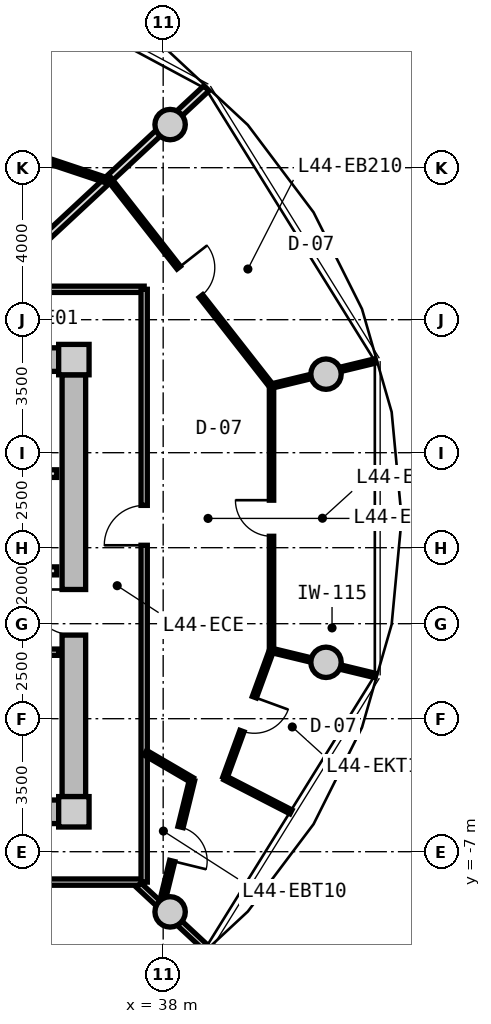
"""IFC4 building model, lengths in metres.
Left out: names, types, materials, properties, quantities, classifications, styles, units other than length and angle.
Written with IfcOpenShell. Run it as: python <this file> out.ifc"""

import sys

from ifc_helpers import new_model, si_unit, direction, frame, frame_2d, origin, origin_2d, place, context, subcontext, project, spatial, rectangle, circle, extrude, source, transform, mapped, element, fill, save


model = new_model("IFC4")
c1 = context("Model", 3, precision=1e-05, world=origin(), true_north=direction((0.0, 1.0)))
c2 = subcontext(c1, "Body", "Model", "MODEL_VIEW")
j1 = project(units=[si_unit("LENGTHUNIT", "METRE"), si_unit("PLANEANGLEUNIT", "RADIAN")], contexts=[c1])
p1 = place(None, origin())
s1 = spatial("IfcSite", under=j1, at=p1, CompositionType="ELEMENT")
p2 = place(p1, origin())
s2 = spatial("IfcBuilding", under=s1, at=p2, CompositionType="ELEMENT")
p3 = place(p2, frame((0.0, 0.0, 143.45)))
s3 = spatial("IfcBuildingStorey", under=s2, at=p3, CompositionType="ELEMENT", Elevation=143.45)
m1 = source(origin(), c2, "Body", "SweptSolid", [
    extrude(rectangle(XDim=0.8, YDim=0.8, at=origin_2d()), origin(), (0.0, 0.0, 1.0), 3.05),
])
for number, where, z_axis, x_axis in (
    (1, (35.65, -5.95, 0.0), (0.0, 0.0, 1.0), (1.0, 0.0, 0.0)),
    (2, (35.65, 5.95, 0.0), (0.0, 0.0, 1.0), (1.0, 0.0, 0.0)),
):
    element("IfcColumn", number, at=place(p3, frame(where, z_axis=z_axis, x_axis=x_axis)), inside=s3, PredefinedType="COLUMN", context=c2, shape_type="MappedRepresentation", body=[
        mapped(m1, transform((0.0, 0.0, 0.0), x_axis=(1.0, 0.0, 0.0), y_axis=(0.0, 1.0, 0.0), z_axis=(0.0, 0.0, 1.0), scale=1.0)),
    ])
m2 = source(origin(), c2, "Body", "SweptSolid", [
    extrude(rectangle(XDim=14.5, YDim=0.62, at=frame_2d((7.25, 0.0))), origin(), (0.0, 0.0, 1.0), 2.81),
])
for number, where, z_axis, x_axis in (
    (3, (20.75, 5.95, 0.0), (0.0, 0.0, 1.0), (1.0, 0.0, 0.0)),
    (4, (35.25, -5.95, 0.0), (0.0, 0.0, 1.0), (-1.0, 0.0, 0.0)),
):
    element("IfcWall", number, at=place(p3, frame(where, z_axis=z_axis, x_axis=x_axis)), inside=s3, PredefinedType="SHEAR", context=c2, shape_type="MappedRepresentation", body=[
        mapped(m2, transform((0.0, 0.0, 0.0), x_axis=(1.0, 0.0, 0.0), y_axis=(0.0, 1.0, 0.0), z_axis=(0.0, 0.0, 1.0), scale=1.0)),
    ])
m3 = source(origin(), c2, "Body", "SweptSolid", [
    extrude(rectangle(XDim=11.1, YDim=0.62, at=frame_2d((5.55, 0.0))), origin(), (0.0, 0.0, 1.0), 2.81),
])
p4 = place(p3, frame((35.65, 5.55, 0.0), z_axis=(0.0, 0.0, 1.0), x_axis=(0.0, -1.0, 0.0)))
e5 = element("IfcWall", 5, at=p4, inside=s3, PredefinedType="SHEAR", context=c2, shape_type="MappedRepresentation", body=[
    mapped(m3, transform((0.0, 0.0, 0.0), x_axis=(1.0, 0.0, 0.0), y_axis=(0.0, 1.0, 0.0), z_axis=(0.0, 0.0, 1.0), scale=1.0)),
])
p5 = place(p4, frame((5.65, 0.0, 0.0)))
e6 = element("IfcOpeningElement", 6, at=p5, cuts=e5, PredefinedType="OPENING", context=c2, shape_type="SweptSolid", body=[
    extrude(rectangle(XDim=1.2, YDim=2.15, at=frame_2d((0.6, 1.075))), frame((0.0, 0.32, 0.0), z_axis=(0.0, -1.0, 0.0), x_axis=(1.0, 0.0, 0.0)), (0.0, 0.0, 1.0), 0.64),
])
m4 = source(origin(), c2, "Body", "SweptSolid", [
    extrude(circle(Radius=0.4, at=origin_2d()), origin(), (0.0, 0.0, 1.0), 3.05),
])
for number, where, z_axis, x_axis in (
    (7, (42.285, 5.567, 0.0), (0.0, 0.0, 1.0), (1.0, 0.0, 0.0)),
    (8, (38.183, 12.135, 0.0), (0.0, 0.0, 1.0), (1.0, 0.0, 0.0)),
    (9, (38.183, -8.584, 0.0), (0.0, 0.0, 1.0), (1.0, 0.0, 0.0)),
    (10, (42.285, -2.016, 0.0), (0.0, 0.0, 1.0), (1.0, 0.0, 0.0)),
):
    element("IfcColumn", number, at=place(p3, frame(where, z_axis=z_axis, x_axis=x_axis)), inside=s3, PredefinedType="COLUMN", context=c2, shape_type="MappedRepresentation", body=[
        mapped(m4, transform((0.0, 0.0, 0.0), x_axis=(1.0, 0.0, 0.0), y_axis=(0.0, 1.0, 0.0), z_axis=(0.0, 0.0, 1.0), scale=1.0)),
    ])
m5 = source(origin(), c2, "Body", "SweptSolid", [
    extrude(rectangle(XDim=3.2, YDim=0.2, at=frame_2d((1.6, 0.0))), origin(), (0.0, 0.0, 1.0), 2.795),
])
p6 = place(p3, frame((32.0, 2.95, 0.0), z_axis=(0.0, 0.0, 1.0), x_axis=(1.0, 0.0, 0.0)))
e11 = element("IfcWall", 11, at=p6, inside=s3, PredefinedType="PARTITIONING", context=c2, shape_type="MappedRepresentation", body=[
    mapped(m5, transform((0.0, 0.0, 0.0), x_axis=(1.0, 0.0, 0.0), y_axis=(0.0, 1.0, 0.0), z_axis=(0.0, 0.0, 1.0), scale=1.0)),
])
m6 = source(origin(), c2, "Body", "SweptSolid", [
    extrude(rectangle(XDim=6.66, YDim=0.21, at=frame_2d((3.33, 0.0))), origin(), (0.0, 0.0, 1.0), 2.795),
])
p7 = place(p3, frame((28.54, 0.39, 0.0), z_axis=(0.0, 0.0, 1.0), x_axis=(1.0, 0.0, 0.0)))
e12 = element("IfcWall", 12, at=p7, inside=s3, PredefinedType="PARTITIONING", context=c2, shape_type="MappedRepresentation", body=[
    mapped(m6, transform((0.0, 0.0, 0.0), x_axis=(1.0, 0.0, 0.0), y_axis=(0.0, 1.0, 0.0), z_axis=(0.0, 0.0, 1.0), scale=1.0)),
])
p8 = place(p7, frame((1.0, 0.0, 0.0)))
e13 = element("IfcOpeningElement", 13, at=p8, cuts=e12, PredefinedType="OPENING", context=c2, shape_type="SweptSolid", body=[
    extrude(rectangle(XDim=1.2, YDim=2.15, at=frame_2d((0.6, 1.075))), frame((0.0, 0.115, 0.0), z_axis=(0.0, -1.0, 0.0), x_axis=(1.0, 0.0, 0.0)), (0.0, 0.0, 1.0), 0.23),
])
m7 = source(origin(), c2, "Body", "SweptSolid", [
    extrude(rectangle(XDim=2.7, YDim=0.165, at=frame_2d((1.35, 0.0))), origin(), (0.0, 0.0, 1.0), 2.795),
])
p9 = place(p3, frame((32.55, -1.75, 0.0), z_axis=(0.0, 0.0, 1.0), x_axis=(1.0, 0.0, 0.0)))
e14 = element("IfcWall", 14, at=p9, inside=s3, PredefinedType="PARTITIONING", context=c2, shape_type="MappedRepresentation", body=[
    mapped(m7, transform((0.0, 0.0, 0.0), x_axis=(1.0, 0.0, 0.0), y_axis=(0.0, 1.0, 0.0), z_axis=(0.0, 0.0, 1.0), scale=1.0)),
])
p10 = place(p9, frame((0.222, 0.0, 0.0)))
e15 = element("IfcOpeningElement", 15, at=p10, cuts=e14, PredefinedType="OPENING", context=c2, shape_type="SweptSolid", body=[
    extrude(rectangle(XDim=0.925, YDim=2.1, at=frame_2d((0.462, 1.05))), frame((0.0, 0.093, 0.0), z_axis=(0.0, -1.0, 0.0), x_axis=(1.0, 0.0, 0.0)), (0.0, 0.0, 1.0), 0.185),
])
p11 = place(p9, frame((1.522, 0.0, 0.0)))
e16 = element("IfcOpeningElement", 16, at=p11, cuts=e14, PredefinedType="OPENING", context=c2, shape_type="SweptSolid", body=[
    extrude(rectangle(XDim=0.925, YDim=2.1, at=frame_2d((0.462, 1.05))), frame((0.0, 0.093, 0.0), z_axis=(0.0, -1.0, 0.0), x_axis=(1.0, 0.0, 0.0)), (0.0, 0.0, 1.0), 0.185),
])
m8 = source(origin(), c2, "Body", "SweptSolid", [
    extrude(rectangle(XDim=8.719, YDim=0.165, at=frame_2d((4.36, 0.0))), origin(), (0.0, 0.0, 1.0), 2.795),
])
p12 = place(p3, frame((28.781, 7.8, 0.0), z_axis=(0.0, 0.0, 1.0), x_axis=(1.0, 0.0, 0.0)))
e17 = element("IfcWall", 17, at=p12, inside=s3, PredefinedType="PARTITIONING", context=c2, shape_type="MappedRepresentation", body=[
    mapped(m8, transform((0.0, 0.0, 0.0), x_axis=(1.0, 0.0, 0.0), y_axis=(0.0, 1.0, 0.0), z_axis=(0.0, 0.0, 1.0), scale=1.0)),
])
p13 = place(p12, frame((0.71, 0.0, 0.0)))
e18 = element("IfcOpeningElement", 18, at=p13, cuts=e17, PredefinedType="OPENING", context=c2, shape_type="SweptSolid", body=[
    extrude(rectangle(XDim=1.05, YDim=2.15, at=frame_2d((0.525, 1.075))), frame((0.0, 0.093, 0.0), z_axis=(0.0, -1.0, 0.0), x_axis=(1.0, 0.0, 0.0)), (0.0, 0.0, 1.0), 0.185),
])
m9 = source(origin(), c2, "Body", "SweptSolid", [
    extrude(rectangle(XDim=8.6, YDim=0.165, at=frame_2d((4.3, 0.0))), origin(), (0.0, 0.0, 1.0), 2.795),
])
p14 = place(p3, frame((37.5, -7.8, 0.0), z_axis=(0.0, 0.0, 1.0), x_axis=(-1.0, 0.0, 0.0)))
e19 = element("IfcWall", 19, at=p14, inside=s3, PredefinedType="PARTITIONING", context=c2, shape_type="MappedRepresentation", body=[
    mapped(m9, transform((0.0, 0.0, 0.0), x_axis=(1.0, 0.0, 0.0), y_axis=(0.0, 1.0, 0.0), z_axis=(0.0, 0.0, 1.0), scale=1.0)),
])
p15 = place(p14, frame((3.775, 0.0, 0.0)))
e20 = element("IfcOpeningElement", 20, at=p15, cuts=e19, PredefinedType="OPENING", context=c2, shape_type="SweptSolid", body=[
    extrude(rectangle(XDim=1.05, YDim=2.15, at=frame_2d((0.525, 1.075))), frame((0.0, 0.093, 0.0), z_axis=(0.0, -1.0, 0.0), x_axis=(1.0, 0.0, 0.0)), (0.0, 0.0, 1.0), 0.185),
])
m10 = source(origin(), c2, "Body", "SweptSolid", [
    extrude(rectangle(XDim=15.6, YDim=0.165, at=frame_2d((7.8, 0.0))), origin(), (0.0, 0.0, 1.0), 2.795),
])
p16 = place(p3, frame((37.5, 7.8, 0.0), z_axis=(0.0, 0.0, 1.0), x_axis=(0.0, -1.0, 0.0)))
e21 = element("IfcWall", 21, at=p16, inside=s3, PredefinedType="PARTITIONING", context=c2, shape_type="MappedRepresentation", body=[
    mapped(m10, transform((0.0, 0.0, 0.0), x_axis=(1.0, 0.0, 0.0), y_axis=(0.0, 1.0, 0.0), z_axis=(0.0, 0.0, 1.0), scale=1.0)),
])
p17 = place(p16, frame((5.687, 0.0, 0.0)))
e22 = element("IfcOpeningElement", 22, at=p17, cuts=e21, PredefinedType="OPENING", context=c2, shape_type="SweptSolid", body=[
    extrude(rectangle(XDim=1.05, YDim=2.15, at=frame_2d((0.525, 1.075))), frame((0.0, 0.093, 0.0), z_axis=(0.0, -1.0, 0.0), x_axis=(1.0, 0.0, 0.0)), (0.0, 0.0, 1.0), 0.185),
])
m11 = source(origin(), c2, "Body", "SweptSolid", [
    extrude(rectangle(XDim=2.435, YDim=0.165, at=frame_2d((1.217, 0.0))), origin(), (0.0, 0.0, 1.0), 2.345),
])
p18 = place(p3, frame((37.354, -7.88, 0.0), z_axis=(0.0, 0.0, 1.0), x_axis=(0.732164643118, -0.681127693878, 0.0)))
e23 = element("IfcWall", 23, at=p18, inside=s3, PredefinedType="PARTITIONING", context=c2, shape_type="MappedRepresentation", body=[
    mapped(m11, transform((0.0, 0.0, 0.0), x_axis=(1.0, 0.0, 0.0), y_axis=(0.0, 1.0, 0.0), z_axis=(0.0, 0.0, 1.0), scale=1.0)),
])
m12 = source(origin(), c2, "Body", "SweptSolid", [
    extrude(rectangle(XDim=7.648, YDim=0.19, at=frame_2d((3.824, 0.0))), origin(), (0.0, 0.0, 1.0), 2.345),
])
p19 = place(p3, frame((33.538, 7.88, 0.0), z_axis=(0.0, 0.0, 1.0), x_axis=(0.732167856666, 0.681124239522, 0.0)))
e24 = element("IfcWall", 24, at=p19, inside=s3, PredefinedType="PARTITIONING", context=c2, shape_type="MappedRepresentation", body=[
    mapped(m12, transform((0.0, 0.0, 0.0), x_axis=(1.0, 0.0, 0.0), y_axis=(0.0, 1.0, 0.0), z_axis=(0.0, 0.0, 1.0), scale=1.0)),
])
m13 = source(origin(), c2, "Body", "SweptSolid", [
    extrude(rectangle(XDim=6.958, YDim=0.115, at=frame_2d((3.479, 0.0))), origin(), (0.0, 0.0, 1.0), 2.795),
])
p20 = place(p3, frame((40.851, -1.703, 0.0), z_axis=(0.0, 0.0, 1.0), x_axis=(0.0, 1.0, 0.0)))
e25 = element("IfcWall", 25, at=p20, inside=s3, PredefinedType="PARTITIONING", context=c2, shape_type="MappedRepresentation", body=[
    mapped(m13, transform((0.0, 0.0, 0.0), x_axis=(1.0, 0.0, 0.0), y_axis=(0.0, 1.0, 0.0), z_axis=(0.0, 0.0, 1.0), scale=1.0)),
])
p21 = place(p20, frame((3.004, 0.0, 0.0)))
e26 = element("IfcOpeningElement", 26, at=p21, cuts=e25, PredefinedType="OPENING", context=c2, shape_type="SweptSolid", body=[
    extrude(rectangle(XDim=0.95, YDim=2.1, at=frame_2d((0.475, 1.05))), frame((0.0, 0.067, 0.0), z_axis=(0.0, -1.0, 0.0), x_axis=(1.0, 0.0, 0.0)), (0.0, 0.0, 1.0), 0.135),
])
m14 = source(origin(), c2, "Body", "SweptSolid", [
    extrude(rectangle(XDim=2.817, YDim=0.115, at=frame_2d((1.408, 0.0))), origin(), (0.0, 0.0, 1.0), 2.345),
])
p22 = place(p3, frame((40.851, -1.703, 0.0), z_axis=(0.0, 0.0, 1.0), x_axis=(0.971960052091, -0.235146033647, 0.0)))
e27 = element("IfcWall", 27, at=p22, inside=s3, PredefinedType="PARTITIONING", context=c2, shape_type="MappedRepresentation", body=[
    mapped(m14, transform((0.0, 0.0, 0.0), x_axis=(1.0, 0.0, 0.0), y_axis=(0.0, 1.0, 0.0), z_axis=(0.0, 0.0, 1.0), scale=1.0)),
])
m15 = source(origin(), c2, "Body", "SweptSolid", [
    extrude(rectangle(XDim=6.966, YDim=0.115, at=frame_2d((3.483, 0.0))), origin(), (0.0, 0.0, 1.0), 2.795),
])
p23 = place(p3, frame((40.85, 5.254, 0.0), z_axis=(0.0, 0.0, 1.0), x_axis=(-0.616695640563, 0.787201681217, 0.0)))
e28 = element("IfcWall", 28, at=p23, inside=s3, PredefinedType="PARTITIONING", context=c2, shape_type="MappedRepresentation", body=[
    mapped(m15, transform((0.0, 0.0, 0.0), x_axis=(1.0, 0.0, 0.0), y_axis=(0.0, 1.0, 0.0), z_axis=(0.0, 0.0, 1.0), scale=1.0)),
])
p24 = place(p23, frame((3.008, 0.0, 0.0)))
e29 = element("IfcOpeningElement", 29, at=p24, cuts=e28, PredefinedType="OPENING", context=c2, shape_type="SweptSolid", body=[
    extrude(rectangle(XDim=0.95, YDim=2.1, at=frame_2d((0.475, 1.05))), frame((0.0, 0.067, 0.0), z_axis=(0.0, -1.0, 0.0), x_axis=(1.0, 0.0, 0.0)), (0.0, 0.0, 1.0), 0.135),
])
m16 = source(origin(), c2, "Body", "SweptSolid", [
    extrude(rectangle(XDim=2.818, YDim=0.115, at=frame_2d((1.409, 0.0))), origin(), (0.0, 0.0, 1.0), 2.345),
])
p25 = place(p3, frame((40.85, 5.254, 0.0), z_axis=(0.0, 0.0, 1.0), x_axis=(0.971949193017, 0.235190914353, 0.0)))
e30 = element("IfcWall", 30, at=p25, inside=s3, PredefinedType="PARTITIONING", context=c2, shape_type="MappedRepresentation", body=[
    mapped(m16, transform((0.0, 0.0, 0.0), x_axis=(1.0, 0.0, 0.0), y_axis=(0.0, 1.0, 0.0), z_axis=(0.0, 0.0, 1.0), scale=1.0)),
])
m17 = source(origin(), c2, "Body", "SweptSolid", [
    extrude(rectangle(XDim=1.425, YDim=0.14, at=frame_2d((0.712, 0.0))), origin(), (0.0, 0.0, 1.0), 2.795),
])
p26 = place(p3, frame((37.53, -4.396, 0.0), z_axis=(0.0, 0.0, 1.0), x_axis=(0.86324395577, -0.50478695786, 0.0)))
e31 = element("IfcWall", 31, at=p26, inside=s3, PredefinedType="PARTITIONING", context=c2, shape_type="MappedRepresentation", body=[
    mapped(m17, transform((0.0, 0.0, 0.0), x_axis=(1.0, 0.0, 0.0), y_axis=(0.0, 1.0, 0.0), z_axis=(0.0, 0.0, 1.0), scale=1.0)),
])
m18 = source(origin(), c2, "Body", "SweptSolid", [
    extrude(rectangle(XDim=3.464, YDim=0.14, at=frame_2d((1.732, 0.0))), origin(), (0.0, 0.0, 1.0), 2.795),
])
p27 = place(p3, frame((38.76, -5.115, 0.0), z_axis=(0.0, 0.0, 1.0), x_axis=(-0.238055968485, -0.971251438027, 0.0)))
e32 = element("IfcWall", 32, at=p27, inside=s3, PredefinedType="PARTITIONING", context=c2, shape_type="MappedRepresentation", body=[
    mapped(m18, transform((0.0, 0.0, 0.0), x_axis=(1.0, 0.0, 0.0), y_axis=(0.0, 1.0, 0.0), z_axis=(0.0, 0.0, 1.0), scale=1.0)),
])
p28 = place(p27, frame((1.272, 0.0, 0.0)))
e33 = element("IfcOpeningElement", 33, at=p28, cuts=e32, PredefinedType="OPENING", context=c2, shape_type="SweptSolid", body=[
    extrude(rectangle(XDim=0.92, YDim=2.1, at=frame_2d((0.46, 1.05))), frame((0.0, 0.08, 0.0), z_axis=(0.0, -1.0, 0.0), x_axis=(1.0, 0.0, 0.0)), (0.0, 0.0, 1.0), 0.16),
])
m19 = source(origin(), c2, "Body", "SweptSolid", [
    extrude(rectangle(XDim=1.957, YDim=0.115, at=frame_2d((0.979, 0.0))), origin(), (0.0, 0.0, 1.0), 2.795),
])
p29 = place(p3, frame((39.623, -5.057, 0.0), z_axis=(0.0, 0.0, 1.0), x_axis=(0.889228358674, -0.45746357902, 0.0)))
e34 = element("IfcWall", 34, at=p29, inside=s3, PredefinedType="PARTITIONING", context=c2, shape_type="MappedRepresentation", body=[
    mapped(m19, transform((0.0, 0.0, 0.0), x_axis=(1.0, 0.0, 0.0), y_axis=(0.0, 1.0, 0.0), z_axis=(0.0, 0.0, 1.0), scale=1.0)),
])
m20 = source(origin(), c2, "Body", "SweptSolid", [
    extrude(rectangle(XDim=3.571, YDim=0.115, at=frame_2d((1.786, 0.0))), origin(), (0.0, 0.0, 1.0), 2.795),
])
p30 = place(p3, frame((39.623, -5.057, 0.0), z_axis=(0.0, 0.0, 1.0), x_axis=(0.343515356993, 0.939147059576, 0.0)))
e35 = element("IfcWall", 35, at=p30, inside=s3, PredefinedType="PARTITIONING", context=c2, shape_type="MappedRepresentation", body=[
    mapped(m20, transform((0.0, 0.0, 0.0), x_axis=(1.0, 0.0, 0.0), y_axis=(0.0, 1.0, 0.0), z_axis=(0.0, 0.0, 1.0), scale=1.0)),
])
p31 = place(p30, frame((1.311, 0.0, 0.0)))
e36 = element("IfcOpeningElement", 36, at=p31, cuts=e35, PredefinedType="OPENING", context=c2, shape_type="SweptSolid", body=[
    extrude(rectangle(XDim=0.95, YDim=2.1, at=frame_2d((0.475, 1.05))), frame((0.0, 0.067, 0.0), z_axis=(0.0, -1.0, 0.0), x_axis=(1.0, 0.0, 0.0)), (0.0, 0.0, 1.0), 0.135),
])
m21 = source(origin(), c2, "Body", "SweptSolid", [
    extrude(rectangle(XDim=3.077, YDim=0.14, at=frame_2d((1.538, 0.0))), origin(), (0.0, 0.0, 1.0), 2.795),
])
p32 = place(p3, frame((33.57, 11.65, 0.0), z_axis=(0.0, 0.0, 1.0), x_axis=(0.948635676976, -0.3163705934, 0.0)))
e37 = element("IfcWall", 37, at=p32, inside=s3, PredefinedType="PARTITIONING", context=c2, shape_type="MappedRepresentation", body=[
    mapped(m21, transform((0.0, 0.0, 0.0), x_axis=(1.0, 0.0, 0.0), y_axis=(0.0, 1.0, 0.0), z_axis=(0.0, 0.0, 1.0), scale=1.0)),
])
m22 = source(origin(), c2, "Body", "SweptSolid", [
    extrude(rectangle(XDim=1.2, YDim=2.15, at=frame_2d((0.6, 1.075))), frame((0.0, 0.025, 0.0), z_axis=(0.0, -1.0, 0.0), x_axis=(1.0, 0.0, 0.0)), (0.0, 0.0, 1.0), 0.05),
])
p33 = place(p5, frame((1.2, 0.0, 0.0), z_axis=(0.0, 0.0, 1.0), x_axis=(-1.0, 0.0, 0.0)))
e38 = element("IfcDoor", 38, at=p33, inside=s3, OperationType="SINGLE_SWING_RIGHT", PredefinedType="DOOR", context=c2, shape_type="MappedRepresentation", body=[
    mapped(m22, transform((0.0, 0.0, 0.0), x_axis=(1.0, 0.0, 0.0), y_axis=(0.0, 1.0, 0.0), z_axis=(0.0, 0.0, 1.0), scale=1.0)),
])
fill(e6, e38)
m23 = source(origin(), c2, "Body", "SweptSolid", [
    extrude(rectangle(XDim=1.05, YDim=2.15, at=frame_2d((0.525, 1.075))), frame((0.0, 0.025, 0.0), z_axis=(0.0, -1.0, 0.0), x_axis=(1.0, 0.0, 0.0)), (0.0, 0.0, 1.0), 0.05),
])
p34 = place(p17, frame((1.05, 0.0, 0.0), z_axis=(0.0, 0.0, 1.0), x_axis=(-1.0, 0.0, 0.0)))
e39 = element("IfcDoor", 39, at=p34, inside=s3, OperationType="SINGLE_SWING_LEFT", PredefinedType="DOOR", context=c2, shape_type="MappedRepresentation", body=[
    mapped(m23, transform((0.0, 0.0, 0.0), x_axis=(1.0, 0.0, 0.0), y_axis=(0.0, 1.0, 0.0), z_axis=(0.0, 0.0, 1.0), scale=1.0)),
])
fill(e22, e39)
m24 = source(origin(), c2, "Body", "SweptSolid", [
    extrude(rectangle(XDim=0.92, YDim=2.1, at=frame_2d((0.46, 1.05))), frame((0.0, 0.025, 0.0), z_axis=(0.0, -1.0, 0.0), x_axis=(1.0, 0.0, 0.0)), (0.0, 0.0, 1.0), 0.05),
])
p35 = place(p28, origin())
e40 = element("IfcDoor", 40, at=p35, inside=s3, OperationType="SINGLE_SWING_RIGHT", PredefinedType="DOOR", context=c2, shape_type="MappedRepresentation", body=[
    mapped(m24, transform((0.0, 0.0, 0.0), x_axis=(1.0, 0.0, 0.0), y_axis=(0.0, 1.0, 0.0), z_axis=(0.0, 0.0, 1.0), scale=1.0)),
])
fill(e33, e40)
m25 = source(origin(), c2, "Body", "SweptSolid", [
    extrude(rectangle(XDim=0.95, YDim=2.1, at=frame_2d((0.475, 1.05))), frame((0.0, 0.025, 0.0), z_axis=(0.0, -1.0, 0.0), x_axis=(1.0, 0.0, 0.0)), (0.0, 0.0, 1.0), 0.05),
])
p36 = place(p31, frame((0.95, 0.0, 0.0), z_axis=(0.0, 0.0, 1.0), x_axis=(-1.0, 0.0, 0.0)))
e41 = element("IfcDoor", 41, at=p36, inside=s3, OperationType="SINGLE_SWING_LEFT", PredefinedType="DOOR", context=c2, shape_type="MappedRepresentation", body=[
    mapped(m25, transform((0.0, 0.0, 0.0), x_axis=(1.0, 0.0, 0.0), y_axis=(0.0, 1.0, 0.0), z_axis=(0.0, 0.0, 1.0), scale=1.0)),
])
fill(e36, e41)
p37 = place(p21, origin())
e42 = element("IfcDoor", 42, at=p37, inside=s3, OperationType="SINGLE_SWING_RIGHT", PredefinedType="DOOR", context=c2, shape_type="MappedRepresentation", body=[
    mapped(m25, transform((0.0, 0.0, 0.0), x_axis=(1.0, 0.0, 0.0), y_axis=(0.0, 1.0, 0.0), z_axis=(0.0, 0.0, 1.0), scale=1.0)),
])
fill(e26, e42)
p38 = place(p24, frame((0.95, 0.0, 0.0), z_axis=(0.0, 0.0, 1.0), x_axis=(-1.0, 0.0, 0.0)))
e43 = element("IfcDoor", 43, at=p38, inside=s3, OperationType="SINGLE_SWING_LEFT", PredefinedType="DOOR", context=c2, shape_type="MappedRepresentation", body=[
    mapped(m25, transform((0.0, 0.0, 0.0), x_axis=(1.0, 0.0, 0.0), y_axis=(0.0, 1.0, 0.0), z_axis=(0.0, 0.0, 1.0), scale=1.0)),
])
fill(e29, e43)
save(model, sys.argv[1])
